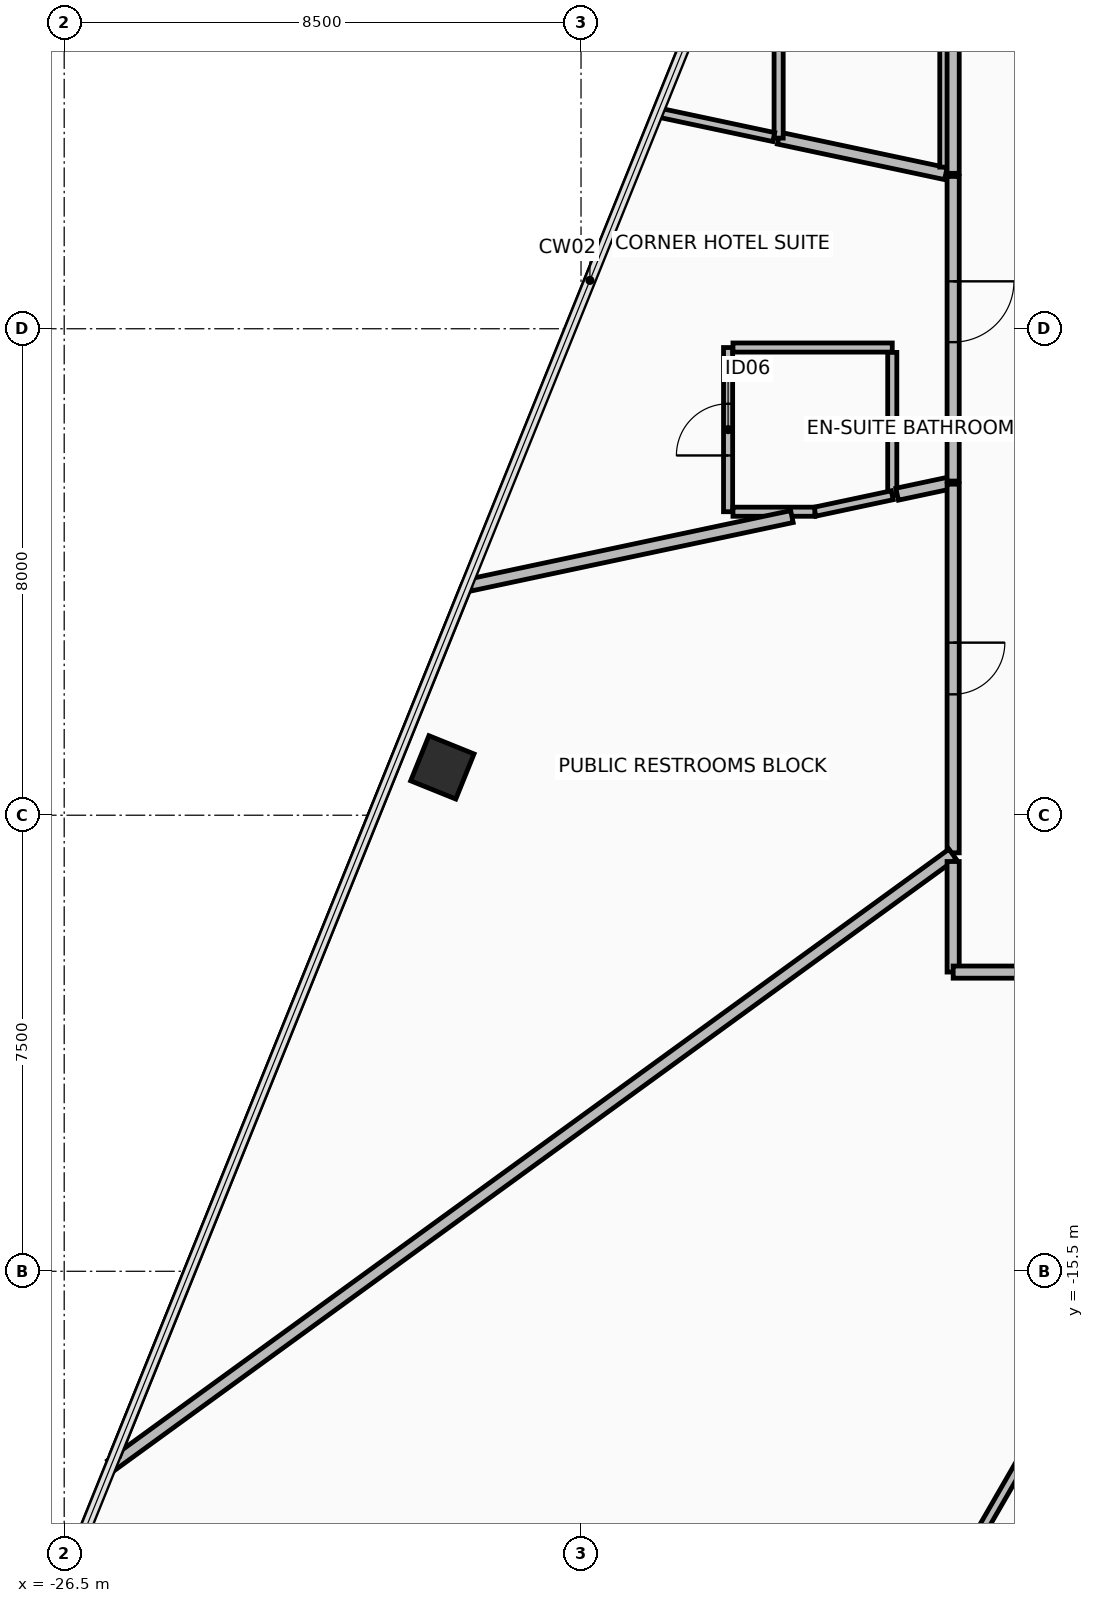
"""IFC4 building model, lengths in metres.
Left out: names, types, materials, properties, quantities, classifications, styles, units other than length and angle.
Written with IfcOpenShell. Run it as: python <this file> out.ifc"""

import sys

from ifc_helpers import new_model, si_unit, direction, frame, frame_2d, origin, origin_2d, place, context, subcontext, project, spatial, rectangle, hollow_rectangle, extrude, element, fill, save


model = new_model("IFC4")
c1 = context("Model", 3, precision=1e-05, world=origin(), true_north=direction((0.0, 1.0)))
c2 = subcontext(c1, "Body", "Model", "MODEL_VIEW")
j1 = project(units=[si_unit("LENGTHUNIT", "METRE"), si_unit("PLANEANGLEUNIT", "RADIAN")], contexts=[c1])
p1 = place(None, origin())
s1 = spatial("IfcSite", under=j1, at=p1, CompositionType="ELEMENT")
p2 = place(p1, origin())
s2 = spatial("IfcBuilding", under=s1, at=p2, CompositionType="ELEMENT")
p3 = place(p2, frame((0.0, 0.0, 63.85)))
s3 = spatial("IfcBuildingStorey", under=s2, at=p3, CompositionType="ELEMENT", Elevation=63.85)
p4 = place(p3, frame((-20.281, -7.213, 0.0), z_axis=(0.0, 0.0, 1.0), x_axis=(0.374608211656, 0.927183200754, 0.0)))
e1 = element("IfcColumn", 1, at=p4, inside=s3, PredefinedType="COLUMN", context=c2, shape_type="SweptSolid", body=[
    extrude(hollow_rectangle(XDim=0.8, YDim=0.8, WallThickness=0.045, at=origin_2d()), origin(), (0.0, 0.0, 1.0), 3.45),
])
p5 = place(p3, frame((-12.0, 2.551, 0.0), z_axis=(0.0, 0.0, 1.0), x_axis=(-0.978151787969, 0.207891990447, 0.0)))
e2 = element("IfcWall", 2, at=p5, inside=s3, PredefinedType="PARTITIONING", context=c2, shape_type="SweptSolid", body=[
    extrude(rectangle(XDim=2.812, YDim=0.2, at=frame_2d((1.406, 0.0))), origin(), (0.0, 0.0, 1.0), 2.87),
])
p6 = place(p3, frame((-14.75, 3.135, 0.0), z_axis=(0.0, 0.0, 1.0), x_axis=(0.0, 1.0, 0.0)))
e3 = element("IfcWall", 3, at=p6, inside=s3, PredefinedType="PARTITIONING", context=c2, shape_type="SweptSolid", body=[
    extrude(rectangle(XDim=2.065, YDim=0.15, at=frame_2d((1.033, 0.0))), origin(), (0.0, 0.0, 1.0), 3.275),
])
p7 = place(p3, frame((-12.0, 5.096, 0.0), z_axis=(0.0, 0.0, 1.0), x_axis=(0.0, -1.0, 0.0)))
e4 = element("IfcWall", 4, at=p7, inside=s3, PredefinedType="PARTITIONING", context=c2, shape_type="SweptSolid", body=[
    extrude(rectangle(XDim=2.438, YDim=0.2, at=frame_2d((1.219, 0.0))), origin(), (0.0, 0.0, 1.0), 3.275),
])
p8 = place(p3, frame((-15.581, -3.009, 0.0), z_axis=(0.0, 0.0, 1.0), x_axis=(0.0, 1.0, 0.0)))
e5 = element("IfcWall", 5, at=p8, inside=s3, PredefinedType="PARTITIONING", context=c2, shape_type="SweptSolid", body=[
    extrude(rectangle(XDim=2.7, YDim=0.15, at=frame_2d((1.35, 0.0))), origin(), (0.0, 0.0, 1.0), 2.87),
])
p9 = place(p8, frame((0.925, 0.0, 0.0)))
e6 = element("IfcOpeningElement", 6, at=p9, cuts=e5, PredefinedType="OPENING", context=c2, shape_type="SweptSolid", body=[
    extrude(rectangle(XDim=0.85, YDim=2.1, at=frame_2d((0.425, 1.05))), frame((0.0, 0.085, 0.0), z_axis=(0.0, -1.0, 0.0), x_axis=(1.0, 0.0, 0.0)), (0.0, 0.0, 1.0), 0.17),
])
p10 = place(p3, frame((-15.501, -0.309, 0.0), z_axis=(0.0, 0.0, 1.0), x_axis=(1.0, 0.0, 0.0)))
e7 = element("IfcWall", 7, at=p10, inside=s3, PredefinedType="PARTITIONING", context=c2, shape_type="SweptSolid", body=[
    extrude(rectangle(XDim=2.62, YDim=0.15, at=frame_2d((1.31, 0.0))), origin(), (0.0, 0.0, 1.0), 2.87),
])
p11 = place(p3, frame((-12.881, -0.389, 0.0), z_axis=(0.0, 0.0, 1.0), x_axis=(0.0, -1.0, 0.0)))
e8 = element("IfcWall", 8, at=p11, inside=s3, PredefinedType="PARTITIONING", context=c2, shape_type="SweptSolid", body=[
    extrude(rectangle(XDim=2.349, YDim=0.15, at=frame_2d((1.175, 0.0))), origin(), (0.0, 0.0, 1.0), 3.275),
])
p12 = place(p3, frame((-12.881, -2.738, 0.0), z_axis=(0.0, 0.0, 1.0), x_axis=(-0.978144076716, -0.207928269327, 0.0)))
e9 = element("IfcWall", 9, at=p12, inside=s3, PredefinedType="PARTITIONING", context=c2, shape_type="SweptSolid", body=[
    extrude(rectangle(XDim=1.302, YDim=0.15, at=frame_2d((0.651, 0.0))), origin(), (0.0, 0.0, 1.0), 2.87),
])
p13 = place(p3, frame((-14.155, -3.009, 0.0), z_axis=(0.0, 0.0, 1.0), x_axis=(-1.0, 0.0, 0.0)))
e10 = element("IfcWall", 10, at=p13, inside=s3, PredefinedType="PARTITIONING", context=c2, shape_type="SweptSolid", body=[
    extrude(rectangle(XDim=1.346, YDim=0.15, at=frame_2d((0.673, 0.0))), origin(), (0.0, 0.0, 1.0), 2.87),
])
p14 = place(p3, frame((-19.87, -4.223, 0.0), z_axis=(0.0, 0.0, 1.0), x_axis=(0.978154530451, 0.20787908639, 0.0)))
e11 = element("IfcWall", 11, at=p14, inside=s3, PredefinedType="PARTITIONING", context=c2, shape_type="SweptSolid", body=[
    extrude(rectangle(XDim=5.458, YDim=0.2, at=frame_2d((2.729, 0.0))), origin(), (0.0, 0.0, 1.0), 2.47),
])
p15 = place(p3, frame((-12.801, -2.721, 0.0), z_axis=(0.0, 0.0, 1.0), x_axis=(0.978138413931, 0.207954906633, 0.0)))
e12 = element("IfcWall", 12, at=p15, inside=s3, PredefinedType="PARTITIONING", context=c2, shape_type="SweptSolid", body=[
    extrude(rectangle(XDim=0.911, YDim=0.2, at=frame_2d((0.456, 0.0))), origin(), (0.0, 0.0, 1.0), 3.275),
])
p16 = place(p3, frame((-11.88, -2.556, 0.0), z_axis=(0.0, 0.0, 1.0), x_axis=(0.0, -1.0, 0.0)))
e13 = element("IfcWall", 13, at=p16, inside=s3, PredefinedType="PARTITIONING", context=c2, shape_type="SweptSolid", body=[
    extrude(rectangle(XDim=6.063, YDim=0.2, at=frame_2d((3.031, 0.0))), origin(), (0.0, 0.0, 1.0), 2.67),
])
p17 = place(p16, frame((2.606, 0.0, 0.0)))
e14 = element("IfcOpeningElement", 14, at=p17, cuts=e13, PredefinedType="OPENING", context=c2, shape_type="SweptSolid", body=[
    extrude(rectangle(XDim=0.85, YDim=2.1, at=frame_2d((0.425, 1.05))), frame((0.0, 0.11, 0.0), z_axis=(0.0, -1.0, 0.0), x_axis=(1.0, 0.0, 0.0)), (0.0, 0.0, 1.0), 0.22),
])
p18 = place(p3, frame((-11.89, -8.639, 0.0), z_axis=(0.0, 0.0, 1.0), x_axis=(-0.809020553383, -0.587780353706, 0.0)))
e15 = element("IfcWall", 15, at=p18, inside=s3, PredefinedType="PARTITIONING", context=c2, shape_type="SweptSolid", body=[
    extrude(rectangle(XDim=17.103, YDim=0.2, at=frame_2d((8.552, 0.0))), origin(), (0.0, 0.0, 1.0), 2.47),
])
p19 = place(p3, frame((-25.653, -18.508, 0.0), z_axis=(0.0, 0.0, 1.0), x_axis=(0.37462120028, 0.927177952877, 0.0)))
e16 = element("IfcWall", 16, at=p19, inside=s3, PredefinedType="PARTITIONING", context=c2, shape_type="SweptSolid", body=[
    extrude(rectangle(XDim=15.391, YDim=0.15, at=frame_2d((7.695, 0.0))), origin(), (0.0, 0.0, 1.0), 3.275),
])
p20 = place(p3, frame((-11.88, 8.619, 0.0), z_axis=(0.0, 0.0, 1.0), x_axis=(0.0, -1.0, 0.0)))
e17 = element("IfcWall", 17, at=p20, inside=s3, PredefinedType="PARTITIONING", context=c2, shape_type="SweptSolid", body=[
    extrude(rectangle(XDim=6.063, YDim=0.2, at=frame_2d((3.031, 0.0))), origin(), (0.0, 0.0, 1.0), 2.67),
])
p21 = place(p20, frame((2.251, 0.0, 0.0)))
e18 = element("IfcOpeningElement", 18, at=p21, cuts=e17, PredefinedType="OPENING", context=c2, shape_type="SweptSolid", body=[
    extrude(rectangle(XDim=1.0, YDim=2.15, at=frame_2d((0.5, 1.075))), frame((0.0, 0.11, 0.0), z_axis=(0.0, -1.0, 0.0), x_axis=(1.0, 0.0, 0.0)), (0.0, 0.0, 1.0), 0.22),
])
p22 = place(p3, frame((-14.83, 3.152, 0.0), z_axis=(0.0, 0.0, 1.0), x_axis=(-0.978137847221, 0.207957572197, 0.0)))
e19 = element("IfcWall", 19, at=p22, inside=s3, PredefinedType="PARTITIONING", context=c2, shape_type="SweptSolid", body=[
    extrude(rectangle(XDim=1.921, YDim=0.15, at=frame_2d((0.96, 0.0))), origin(), (0.0, 0.0, 1.0), 2.47),
])
p23 = place(p3, frame((-11.88, 2.505, 0.0), z_axis=(0.0, 0.0, 1.0), x_axis=(0.0, -1.0, 0.0)))
e20 = element("IfcWall", 20, at=p23, inside=s3, PredefinedType="PARTITIONING", context=c2, shape_type="SweptSolid", body=[
    extrude(rectangle(XDim=5.01, YDim=0.2, at=frame_2d((2.505, 0.0))), origin(), (0.0, 0.0, 1.0), 3.275),
])
p24 = place(p23, frame((1.725, 0.0, 0.0)))
e21 = element("IfcOpeningElement", 21, at=p24, cuts=e20, PredefinedType="OPENING", context=c2, shape_type="SweptSolid", body=[
    extrude(rectangle(XDim=1.0, YDim=2.15, at=frame_2d((0.5, 1.075))), frame((0.0, 0.11, 0.0), z_axis=(0.0, -1.0, 0.0), x_axis=(1.0, 0.0, 0.0)), (0.0, 0.0, 1.0), 0.22),
])
p25 = place(p3, frame((-11.88, -8.761, 0.0), z_axis=(0.0, 0.0, 1.0), x_axis=(0.0, -1.0, 0.0)))
e22 = element("IfcWall", 22, at=p25, inside=s3, PredefinedType="PARTITIONING", context=c2, shape_type="SweptSolid", body=[
    extrude(rectangle(XDim=1.818, YDim=0.2, at=frame_2d((0.909, 0.0))), origin(), (0.0, 0.0, 1.0), 2.67),
])
p26 = place(p3, frame((-11.879, -10.58, 0.0), z_axis=(0.0, 0.0, 1.0), x_axis=(1.0, 0.0, 0.0)))
e23 = element("IfcWall", 23, at=p26, inside=s3, PredefinedType="PARTITIONING", context=c2, shape_type="SweptSolid", body=[
    extrude(rectangle(XDim=5.728, YDim=0.2, at=frame_2d((2.864, 0.0))), origin(), (0.0, 0.0, 1.0), 2.67),
])
p27 = place(p26, frame((2.924, 0.0, 0.0)))
e24 = element("IfcOpeningElement", 24, at=p27, cuts=e23, PredefinedType="OPENING", context=c2, shape_type="SweptSolid", body=[
    extrude(rectangle(XDim=1.0, YDim=2.15, at=frame_2d((0.5, 1.075))), frame((0.0, 0.11, 0.0), z_axis=(0.0, -1.0, 0.0), x_axis=(1.0, 0.0, 0.0)), (0.0, 0.0, 1.0), 0.22),
])
p28 = place(p3, frame((-8.563, -14.832, 0.0), z_axis=(0.0, 0.0, 1.0), x_axis=(-0.500008475426, -0.86602051044, 0.0)))
e25 = element("IfcWall", 25, at=p28, inside=s3, PredefinedType="PARTITIONING", context=c2, shape_type="SweptSolid", body=[
    extrude(rectangle(XDim=12.561, YDim=0.15, at=frame_2d((6.28, 0.0))), origin(), (0.0, 0.0, 1.0), 2.47),
])
p29 = place(p9, origin())
e26 = element("IfcDoor", 26, at=p29, inside=s3, OperationType="SINGLE_SWING_RIGHT", PredefinedType="DOOR", context=c2, shape_type="SweptSolid", body=[
    extrude(rectangle(XDim=0.85, YDim=2.1, at=frame_2d((0.425, 1.05))), frame((0.0, 0.025, 0.0), z_axis=(0.0, -1.0, 0.0), x_axis=(1.0, 0.0, 0.0)), (0.0, 0.0, 1.0), 0.05),
])
fill(e6, e26)
p30 = place(p17, origin())
e27 = element("IfcDoor", 27, at=p30, inside=s3, OperationType="SINGLE_SWING_RIGHT", PredefinedType="DOOR", context=c2, shape_type="SweptSolid", body=[
    extrude(rectangle(XDim=0.85, YDim=2.1, at=frame_2d((0.425, 1.05))), frame((0.0, 0.025, 0.0), z_axis=(0.0, -1.0, 0.0), x_axis=(1.0, 0.0, 0.0)), (0.0, 0.0, 1.0), 0.05),
])
fill(e14, e27)
p31 = place(p24, origin())
e28 = element("IfcDoor", 28, at=p31, inside=s3, OperationType="SINGLE_SWING_LEFT", PredefinedType="DOOR", context=c2, shape_type="SweptSolid", body=[
    extrude(rectangle(XDim=1.0, YDim=2.15, at=frame_2d((0.5, 1.075))), frame((0.0, 0.025, 0.0), z_axis=(0.0, -1.0, 0.0), x_axis=(1.0, 0.0, 0.0)), (0.0, 0.0, 1.0), 0.05),
])
fill(e21, e28)
save(model, sys.argv[1])
